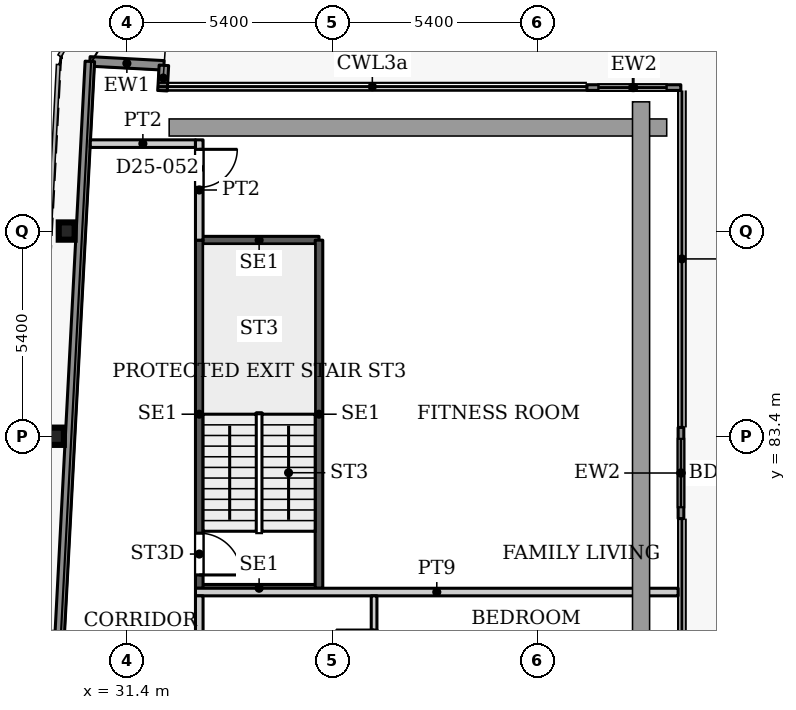
"""IFC4 building model, lengths in metres.
Left out: names, types, materials, properties, quantities, classifications, styles, units other than length and angle.
Written with IfcOpenShell. Run it as: python <this file> out.ifc"""

import sys

from ifc_helpers import new_model, si_unit, direction, frame, frame_2d, origin, origin_2d, place, context, subcontext, project, spatial, rectangle, i_section, extrude, source, transform, mapped, element, fill, save


model = new_model("IFC4")
c1 = context("Model", 3, precision=1e-05, world=origin(), true_north=direction((0.0, 1.0)))
c2 = subcontext(c1, "Body", "Model", "MODEL_VIEW")
j1 = project(units=[si_unit("LENGTHUNIT", "METRE"), si_unit("PLANEANGLEUNIT", "RADIAN")], contexts=[c1])
p1 = place(None, origin())
s1 = spatial("IfcSite", under=j1, at=p1, CompositionType="ELEMENT")
p2 = place(p1, origin())
s2 = spatial("IfcBuilding", under=s1, at=p2, CompositionType="ELEMENT")
p3 = place(p2, frame((0.0, 0.0, 109.7)))
s3 = spatial("IfcBuildingStorey", under=s2, at=p3, CompositionType="ELEMENT", Elevation=109.7)
for number, where, z_axis, x_axis in (
    (1, (29.527, 83.4, 0.0), (0.0, 0.0, 1.0), (1.0, 0.0, 0.0)),
    (2, (29.811, 88.8, 0.0), (0.0, 0.0, 1.0), (1.0, 0.0, 0.0)),
):
    element("IfcColumn", number, at=place(p3, frame(where, z_axis=z_axis, x_axis=x_axis)), inside=s3, PredefinedType="COLUMN", context=c2, shape_type="SweptSolid", body=[
        extrude(i_section(OverallWidth=0.418, OverallDepth=0.455, WebThickness=0.042, FlangeThickness=0.068, FilletRadius=0.014, at=origin_2d()), origin(), (0.0, 0.0, 1.0), 3.9),
    ])
p4 = place(p3, frame((30.421, 93.264, 0.0), z_axis=(0.0, 0.0, 1.0), x_axis=(0.998577785791, -0.053314216913, 0.0)))
e3 = element("IfcWall", 3, at=p4, inside=s3, PredefinedType="SOLIDWALL", context=c2, shape_type="SweptSolid", body=[
    extrude(rectangle(XDim=1.951, YDim=0.25, at=frame_2d((0.975, 0.0))), origin(), (0.0, 0.0, 1.0), 3.75),
])
p5 = place(p3, frame((32.369, 93.16, 0.0), z_axis=(0.0, 0.0, 1.0), x_axis=(-0.053729014033, -0.998555553312, 0.0)))
e4 = element("IfcWall", 4, at=p5, inside=s3, PredefinedType="SOLIDWALL", context=c2, shape_type="SweptSolid", body=[
    extrude(rectangle(XDim=0.668, YDim=0.25, at=frame_2d((0.334, 0.0))), origin(), (0.0, 0.0, 1.0), 3.75),
])
p6 = place(p3, frame((43.5, 92.575, 0.0), z_axis=(0.0, 0.0, 1.0), x_axis=(1.0, 0.0, 0.0)))
e5 = element("IfcWall", 5, at=p6, inside=s3, PredefinedType="SOLIDWALL", context=c2, shape_type="SweptSolid", body=[
    extrude(rectangle(XDim=2.471, YDim=0.15, at=frame_2d((1.235, 0.0))), origin(), (0.0, 0.0, 1.0), 3.75),
])
p7 = place(p6, frame((0.3, 0.0, 0.0)))
e6 = element("IfcOpeningElement", 6, at=p7, cuts=e5, PredefinedType="OPENING", context=c2, shape_type="SweptSolid", body=[
    extrude(rectangle(XDim=1.8, YDim=2.4, at=frame_2d((0.9, 1.2))), frame((0.0, 0.085, 0.0), z_axis=(0.0, -1.0, 0.0), x_axis=(1.0, 0.0, 0.0)), (0.0, 0.0, 1.0), 0.17),
])
p8 = place(p3, frame((45.975, 83.632, 0.0), z_axis=(0.0, 0.0, 1.0), x_axis=(0.0, -1.0, 0.0)))
e7 = element("IfcWall", 7, at=p8, inside=s3, PredefinedType="SOLIDWALL", context=c2, shape_type="SweptSolid", body=[
    extrude(rectangle(XDim=2.399, YDim=0.15, at=frame_2d((1.2, 0.0))), origin(), (0.0, 0.0, 1.0), 3.75),
])
p9 = place(p8, frame((0.3, 0.0, 0.0)))
e8 = element("IfcOpeningElement", 8, at=p9, cuts=e7, PredefinedType="OPENING", context=c2, shape_type="SweptSolid", body=[
    extrude(rectangle(XDim=1.8, YDim=2.4, at=frame_2d((0.9, 1.2))), frame((0.0, 0.085, 0.0), z_axis=(0.0, -1.0, 0.0), x_axis=(1.0, 0.0, 0.0)), (0.0, 0.0, 1.0), 0.17),
])
p10 = place(p3, frame((27.195, 31.969, 0.0), z_axis=(0.0, 0.0, 1.0), x_axis=(0.052555284099, 0.998618016117, 0.0)))
e9 = element("IfcWall", 9, at=p10, inside=s3, PredefinedType="SOLIDWALL", context=c2, shape_type="SweptSolid", body=[
    extrude(rectangle(XDim=61.38, YDim=0.25, at=frame_2d((30.69, 0.0))), origin(), (0.0, 0.0, 1.0), 3.75),
])
for number, where, z_axis, x_axis in (
    (10, (33.3, 79.4, 0.0), (0.0, 0.0, 1.0), (1.0, 0.0, 0.0)),
    (11, (33.3, 88.56, 0.0), (0.0, 0.0, 1.0), (1.0, 0.0, 0.0)),
):
    element("IfcWall", number, at=place(p3, frame(where, z_axis=z_axis, x_axis=x_axis)), inside=s3, PredefinedType="SHEAR", context=c2, shape_type="SweptSolid", body=[
        extrude(rectangle(XDim=3.15, YDim=0.2, at=frame_2d((1.575, 0.0))), origin(), (0.0, 0.0, 1.0), 3.9),
    ])
p11 = place(p3, frame((33.3, 79.4, 0.0), z_axis=(0.0, 0.0, 1.0), x_axis=(0.0, 1.0, 0.0)))
e12 = element("IfcWall", 12, at=p11, inside=s3, PredefinedType="SHEAR", context=c2, shape_type="SweptSolid", body=[
    extrude(rectangle(XDim=9.16, YDim=0.2, at=frame_2d((4.58, 0.0))), origin(), (0.0, 0.0, 1.0), 3.9),
])
p12 = place(p11, frame((0.35, 0.0, 0.0)))
e13 = element("IfcOpeningElement", 13, at=p12, cuts=e12, PredefinedType="OPENING", context=c2, shape_type="SweptSolid", body=[
    extrude(rectangle(XDim=1.1, YDim=2.2, at=frame_2d((0.55, 1.1))), frame((0.0, 0.11, 0.0), z_axis=(0.0, -1.0, 0.0), x_axis=(1.0, 0.0, 0.0)), (0.0, 0.0, 1.0), 0.22),
])
p13 = place(p3, frame((36.45, 79.4, 0.0), z_axis=(0.0, 0.0, 1.0), x_axis=(0.0, 1.0, 0.0)))
e14 = element("IfcWall", 14, at=p13, inside=s3, PredefinedType="SHEAR", context=c2, shape_type="SweptSolid", body=[
    extrude(rectangle(XDim=9.16, YDim=0.2, at=frame_2d((4.58, 0.0))), origin(), (0.0, 0.0, 1.0), 3.9),
])
p14 = place(p3, frame((30.432, 91.1, 0.0), z_axis=(0.0, 0.0, 1.0), x_axis=(1.0, 0.0, 0.0)))
e15 = element("IfcWall", 15, at=p14, inside=s3, PredefinedType="PARTITIONING", context=c2, shape_type="SweptSolid", body=[
    extrude(rectangle(XDim=2.768, YDim=0.2, at=frame_2d((1.384, 0.0))), origin(), (0.0, 0.0, 1.0), 3.6),
])
p15 = place(p3, frame((33.2, 79.3, 0.0), z_axis=(0.0, 0.0, 1.0), x_axis=(1.0, 0.0, 0.0)))
e16 = element("IfcWall", 16, at=p15, inside=s3, PredefinedType="PARTITIONING", context=c2, shape_type="SweptSolid", body=[
    extrude(rectangle(XDim=12.7, YDim=0.2, at=frame_2d((6.35, 0.0))), origin(), (0.0, 0.0, 1.0), 3.6),
])
p16 = place(p3, frame((33.3, 54.4, 0.0), z_axis=(0.0, 0.0, 1.0), x_axis=(0.0, 1.0, 0.0)))
e17 = element("IfcWall", 17, at=p16, inside=s3, PredefinedType="PARTITIONING", context=c2, shape_type="SweptSolid", body=[
    extrude(rectangle(XDim=24.8, YDim=0.2, at=frame_2d((12.4, 0.0))), origin(), (0.0, 0.0, 1.0), 3.6),
])
p17 = place(p16, frame((2.5, 0.0, 0.0)))
e18 = element("IfcOpeningElement", 18, at=p17, cuts=e17, PredefinedType="OPENING", context=c2, shape_type="SweptSolid", body=[
    extrude(rectangle(XDim=1.0, YDim=2.1, at=frame_2d((0.5, 1.05))), frame((0.0, 0.11, 0.0), z_axis=(0.0, -1.0, 0.0), x_axis=(1.0, 0.0, 0.0)), (0.0, 0.0, 1.0), 0.22),
])
p18 = place(p16, frame((22.6, 0.0, 0.0)))
e19 = element("IfcOpeningElement", 19, at=p18, cuts=e17, PredefinedType="OPENING", context=c2, shape_type="SweptSolid", body=[
    extrude(rectangle(XDim=1.0, YDim=2.1, at=frame_2d((0.5, 1.05))), frame((0.0, 0.11, 0.0), z_axis=(0.0, -1.0, 0.0), x_axis=(1.0, 0.0, 0.0)), (0.0, 0.0, 1.0), 0.22),
])
p19 = place(p3, frame((33.3, 88.56, 0.0), z_axis=(0.0, 0.0, 1.0), x_axis=(0.0, 1.0, 0.0)))
e20 = element("IfcWall", 20, at=p19, inside=s3, PredefinedType="PARTITIONING", context=c2, shape_type="SweptSolid", body=[
    extrude(rectangle(XDim=2.64, YDim=0.2, at=frame_2d((1.32, 0.0))), origin(), (0.0, 0.0, 1.0), 3.6),
])
p20 = place(p19, frame((1.39, 0.0, 0.0)))
e21 = element("IfcOpeningElement", 21, at=p20, cuts=e20, PredefinedType="OPENING", context=c2, shape_type="SweptSolid", body=[
    extrude(rectangle(XDim=1.0, YDim=2.1, at=frame_2d((0.5, 1.05))), frame((0.0, 0.11, 0.0), z_axis=(0.0, -1.0, 0.0), x_axis=(1.0, 0.0, 0.0)), (0.0, 0.0, 1.0), 0.22),
])
p21 = place(p3, frame((37.9, 63.5, 0.0), z_axis=(0.0, 0.0, 1.0), x_axis=(0.0, 1.0, 0.0)))
e22 = element("IfcWall", 22, at=p21, inside=s3, PredefinedType="PARTITIONING", context=c2, shape_type="SweptSolid", body=[
    extrude(rectangle(XDim=15.7, YDim=0.15, at=frame_2d((7.85, 0.0))), origin(), (0.0, 0.0, 1.0), 3.6),
])
p22 = place(p21, frame((1.1, 0.0, 0.0)))
e23 = element("IfcOpeningElement", 23, at=p22, cuts=e22, PredefinedType="OPENING", context=c2, shape_type="SweptSolid", body=[
    extrude(rectangle(XDim=0.9, YDim=2.1, at=frame_2d((0.45, 1.05))), frame((0.0, 0.085, 0.0), z_axis=(0.0, -1.0, 0.0), x_axis=(1.0, 0.0, 0.0)), (0.0, 0.0, 1.0), 0.17),
])
p23 = place(p21, frame((10.85, 0.0, 0.0)))
e24 = element("IfcOpeningElement", 24, at=p23, cuts=e22, PredefinedType="OPENING", context=c2, shape_type="SweptSolid", body=[
    extrude(rectangle(XDim=0.9, YDim=2.1, at=frame_2d((0.45, 1.05))), frame((0.0, 0.085, 0.0), z_axis=(0.0, -1.0, 0.0), x_axis=(1.0, 0.0, 0.0)), (0.0, 0.0, 1.0), 0.17),
])
p24 = place(p21, frame((13.8, 0.0, 0.0)))
e25 = element("IfcOpeningElement", 25, at=p24, cuts=e22, PredefinedType="OPENING", context=c2, shape_type="SweptSolid", body=[
    extrude(rectangle(XDim=1.0, YDim=2.1, at=frame_2d((0.5, 1.05))), frame((0.0, 0.085, 0.0), z_axis=(0.0, -1.0, 0.0), x_axis=(1.0, 0.0, 0.0)), (0.0, 0.0, 1.0), 0.17),
])
p25 = place(p21, frame((4.1, 0.0, 0.0)))
e26 = element("IfcOpeningElement", 26, at=p25, cuts=e22, PredefinedType="OPENING", context=c2, shape_type="SweptSolid", body=[
    extrude(rectangle(XDim=0.9, YDim=2.1, at=frame_2d((0.45, 1.05))), frame((0.0, 0.085, 0.0), z_axis=(0.0, -1.0, 0.0), x_axis=(1.0, 0.0, 0.0)), (0.0, 0.0, 1.0), 0.17),
])
p26 = place(p21, frame((8.45, 0.0, 0.0)))
e27 = element("IfcOpeningElement", 27, at=p26, cuts=e22, PredefinedType="OPENING", context=c2, shape_type="SweptSolid", body=[
    extrude(rectangle(XDim=0.9, YDim=2.1, at=frame_2d((0.45, 1.05))), frame((0.0, 0.085, 0.0), z_axis=(0.0, -1.0, 0.0), x_axis=(1.0, 0.0, 0.0)), (0.0, 0.0, 1.0), 0.17),
])
m1 = source(origin(), c2, "Body", "SweptSolid", [
    extrude(rectangle(XDim=1.8, YDim=2.4, at=frame_2d((0.9, 1.2))), frame((0.0, 0.025, 0.0), z_axis=(0.0, -1.0, 0.0), x_axis=(1.0, 0.0, 0.0)), (0.0, 0.0, 1.0), 0.05),
])
p27 = place(p7, origin())
e28 = element("IfcDoor", 28, at=p27, inside=s3, OperationType="SLIDING_TO_LEFT", PredefinedType="DOOR", context=c2, shape_type="MappedRepresentation", body=[
    mapped(m1, transform((0.0, 0.0, 0.0), x_axis=(1.0, 0.0, 0.0), y_axis=(0.0, 1.0, 0.0), z_axis=(0.0, 0.0, 1.0), scale=1.0)),
])
fill(e6, e28)
p28 = place(p9, origin())
e29 = element("IfcDoor", 29, at=p28, inside=s3, OperationType="SLIDING_TO_LEFT", PredefinedType="DOOR", context=c2, shape_type="MappedRepresentation", body=[
    mapped(m1, transform((0.0, 0.0, 0.0), x_axis=(1.0, 0.0, 0.0), y_axis=(0.0, 1.0, 0.0), z_axis=(0.0, 0.0, 1.0), scale=1.0)),
])
fill(e8, e29)
m2 = source(origin(), c2, "Body", "SweptSolid", [
    extrude(rectangle(XDim=1.1, YDim=2.2, at=frame_2d((0.55, 1.1))), frame((0.0, 0.025, 0.0), z_axis=(0.0, -1.0, 0.0), x_axis=(1.0, 0.0, 0.0)), (0.0, 0.0, 1.0), 0.05),
])
p29 = place(p12, origin())
e30 = element("IfcDoor", 30, at=p29, inside=s3, OperationType="SINGLE_SWING_RIGHT", PredefinedType="DOOR", context=c2, shape_type="MappedRepresentation", body=[
    mapped(m2, transform((0.0, 0.0, 0.0), x_axis=(1.0, 0.0, 0.0), y_axis=(0.0, 1.0, 0.0), z_axis=(0.0, 0.0, 1.0), scale=1.0)),
])
fill(e13, e30)
m3 = source(origin(), c2, "Body", "SweptSolid", [
    extrude(rectangle(XDim=1.0, YDim=2.1, at=frame_2d((0.5, 1.05))), frame((0.0, 0.025, 0.0), z_axis=(0.0, -1.0, 0.0), x_axis=(1.0, 0.0, 0.0)), (0.0, 0.0, 1.0), 0.05),
])
p30 = place(p20, origin())
e31 = element("IfcDoor", 31, at=p30, inside=s3, OperationType="SINGLE_SWING_RIGHT", PredefinedType="DOOR", context=c2, shape_type="MappedRepresentation", body=[
    mapped(m3, transform((0.0, 0.0, 0.0), x_axis=(1.0, 0.0, 0.0), y_axis=(0.0, 1.0, 0.0), z_axis=(0.0, 0.0, 1.0), scale=1.0)),
])
fill(e21, e31)
save(model, sys.argv[1])
